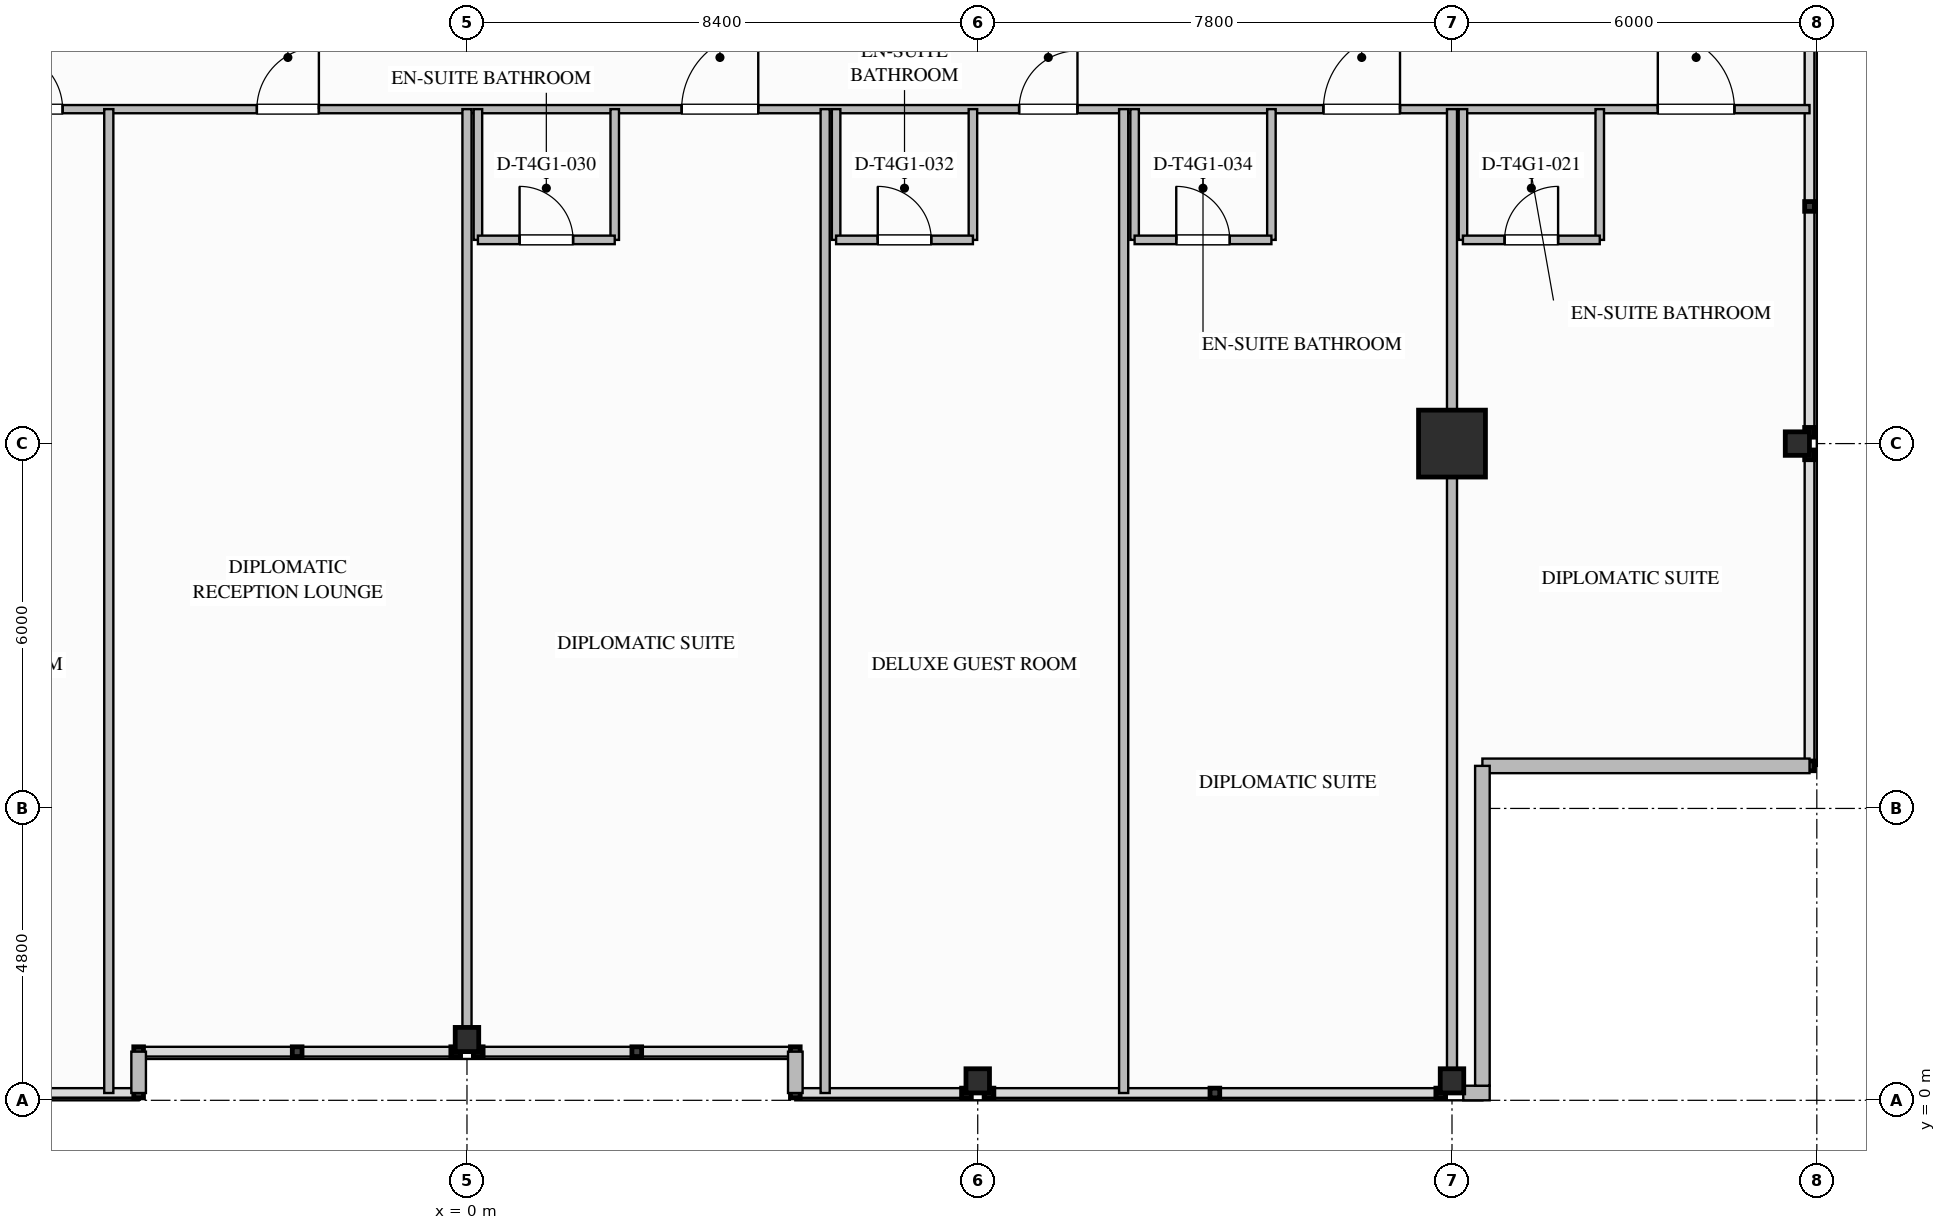
"""IFC4 building model, lengths in metres.
Left out: names, types, materials, properties, quantities, classifications, styles, units other than length and angle.
Written with IfcOpenShell. Run it as: python <this file> out.ifc"""

import sys

from ifc_helpers import new_model, si_unit, direction, frame, frame_2d, origin, origin_2d, place, context, subcontext, project, spatial, rectangle, i_section, extrude, element, fill, save


model = new_model("IFC4")
c1 = context("Model", 3, precision=1e-05, world=origin(), true_north=direction((0.0, 1.0)))
c2 = subcontext(c1, "Body", "Model", "MODEL_VIEW")
j1 = project(units=[si_unit("LENGTHUNIT", "METRE"), si_unit("PLANEANGLEUNIT", "RADIAN")], contexts=[c1])
p1 = place(None, origin())
s1 = spatial("IfcSite", under=j1, at=p1, CompositionType="ELEMENT")
p2 = place(p1, origin())
s2 = spatial("IfcBuilding", under=s1, at=p2, CompositionType="ELEMENT")
p3 = place(p2, frame((0.0, 0.0, 208.7)))
s3 = spatial("IfcBuildingStorey", under=s2, at=p3, CompositionType="ELEMENT", Elevation=208.7)
p4 = place(p3, frame((16.2, 10.8, 0.0), z_axis=(0.0, 0.0, 1.0), x_axis=(1.0, 0.0, 0.0)))
e1 = element("IfcColumn", 1, at=p4, inside=s3, PredefinedType="COLUMN", context=c2, shape_type="SweptSolid", body=[
    extrude(rectangle(XDim=1.1, YDim=1.1, at=origin_2d()), origin(), (0.0, 0.0, 1.0), 3.6),
])
for number, where, z_axis, x_axis in (
    (2, (21.88, 10.8, 0.0), (0.0, 0.0, 1.0), (1.0, 0.0, 0.0)),
    (3, (0.0, 1.0, 0.0), (0.0, 0.0, 1.0), (0.0, 1.0, 0.0)),
    (4, (8.4, 0.32, 0.0), (0.0, 0.0, 1.0), (0.0, 1.0, 0.0)),
    (5, (16.2, 0.32, 0.0), (0.0, 0.0, 1.0), (0.0, 1.0, 0.0)),
):
    element("IfcColumn", number, at=place(p3, frame(where, z_axis=z_axis, x_axis=x_axis)), inside=s3, PredefinedType="COLUMN", context=c2, shape_type="SweptSolid", body=[
        extrude(i_section(OverallWidth=0.397, OverallDepth=0.387, WebThickness=0.021, FlangeThickness=0.033, FilletRadius=0.025, at=origin_2d()), origin(), (0.0, 0.0, 1.0), 3.597),
    ])
p5 = place(p3, frame((16.82, 0.12, 0.0), z_axis=(0.0, 0.0, 1.0), x_axis=(-1.0, 0.0, 0.0)))
e6 = element("IfcWall", 6, at=p5, inside=s3, PredefinedType="STANDARD", context=c2, shape_type="SweptSolid", body=[
    extrude(rectangle(XDim=0.435, YDim=0.24, at=frame_2d((0.217, 0.0))), origin(), (0.0, 0.0, 1.0), 3.34),
])
p6 = place(p3, frame((22.08, 5.5, 0.0), z_axis=(0.0, 0.0, 1.0), x_axis=(-1.0, 0.0, 0.0)))
e7 = element("IfcWall", 7, at=p6, inside=s3, PredefinedType="STANDARD", context=c2, shape_type="SweptSolid", body=[
    extrude(rectangle(XDim=5.38, YDim=0.24, at=frame_2d((2.69, 0.0))), origin(), (0.0, 0.0, 1.0), 3.34),
])
p7 = place(p3, frame((16.7, 5.5, 0.0), z_axis=(0.0, 0.0, 1.0), x_axis=(0.0, -1.0, 0.0)))
e8 = element("IfcWall", 8, at=p7, inside=s3, PredefinedType="STANDARD", context=c2, shape_type="SweptSolid", body=[
    extrude(rectangle(XDim=5.26, YDim=0.24, at=frame_2d((2.63, 0.0))), origin(), (0.0, 0.0, 1.0), 3.34),
])
for number, where, z_axis, x_axis in (
    (9, (5.4, 0.12, 0.0), (0.0, 0.0, 1.0), (0.0, 1.0, 0.0)),
    (10, (-5.4, 0.8, 0.0), (0.0, 0.0, 1.0), (0.0, -1.0, 0.0)),
):
    element("IfcWall", number, at=place(p3, frame(where, z_axis=z_axis, x_axis=x_axis)), inside=s3, PredefinedType="STANDARD", context=c2, shape_type="SweptSolid", body=[
        extrude(rectangle(XDim=0.68, YDim=0.24, at=frame_2d((0.34, 0.0))), origin(), (0.0, 0.0, 1.0), 3.34),
    ])
p8 = place(p3, frame((-16.2, 16.3, 0.0), z_axis=(0.0, 0.0, 1.0), x_axis=(1.0, 0.0, 0.0)))
e11 = element("IfcWall", 11, at=p8, inside=s3, PredefinedType="PARTITIONING", context=c2, shape_type="SweptSolid", body=[
    extrude(rectangle(XDim=38.28, YDim=0.135, at=frame_2d((19.14, 0.0))), origin(), (0.0, 0.0, 1.0), 3.34),
])
p9 = place(p8, frame((35.785, 0.0, 0.0)))
e12 = element("IfcOpeningElement", 12, at=p9, cuts=e11, PredefinedType="OPENING", context=c2, shape_type="SweptSolid", body=[
    extrude(rectangle(XDim=1.26, YDim=2.2, at=frame_2d((0.63, 1.1))), frame((0.0, 0.077, 0.0), z_axis=(0.0, -1.0, 0.0), x_axis=(1.0, 0.0, 0.0)), (0.0, 0.0, 1.0), 0.155),
])
p10 = place(p8, frame((3.285, 0.0, 0.0)))
e13 = element("IfcOpeningElement", 13, at=p10, cuts=e11, PredefinedType="OPENING", context=c2, shape_type="SweptSolid", body=[
    extrude(rectangle(XDim=1.26, YDim=2.2, at=frame_2d((0.63, 1.1))), frame((0.0, 0.077, 0.0), z_axis=(0.0, -1.0, 0.0), x_axis=(1.0, 0.0, 0.0)), (0.0, 0.0, 1.0), 0.155),
])
p11 = place(p8, frame((8.59, 0.0, 0.0)))
e14 = element("IfcOpeningElement", 14, at=p11, cuts=e11, PredefinedType="OPENING", context=c2, shape_type="SweptSolid", body=[
    extrude(rectangle(XDim=0.96, YDim=2.15, at=frame_2d((0.48, 1.075))), frame((0.0, 0.077, 0.0), z_axis=(0.0, -1.0, 0.0), x_axis=(1.0, 0.0, 0.0)), (0.0, 0.0, 1.0), 0.155),
])
p12 = place(p8, frame((12.744, 0.0, 0.0)))
e15 = element("IfcOpeningElement", 15, at=p12, cuts=e11, PredefinedType="OPENING", context=c2, shape_type="SweptSolid", body=[
    extrude(rectangle(XDim=1.02, YDim=2.15, at=frame_2d((0.51, 1.075))), frame((0.0, 0.077, 0.0), z_axis=(0.0, -1.0, 0.0), x_axis=(1.0, 0.0, 0.0)), (0.0, 0.0, 1.0), 0.155),
])
p13 = place(p8, frame((19.73, 0.0, 0.0)))
e16 = element("IfcOpeningElement", 16, at=p13, cuts=e11, PredefinedType="OPENING", context=c2, shape_type="SweptSolid", body=[
    extrude(rectangle(XDim=1.26, YDim=2.2, at=frame_2d((0.63, 1.1))), frame((0.0, 0.077, 0.0), z_axis=(0.0, -1.0, 0.0), x_axis=(1.0, 0.0, 0.0)), (0.0, 0.0, 1.0), 0.155),
])
p14 = place(p8, frame((25.281, 0.0, 0.0)))
e17 = element("IfcOpeningElement", 17, at=p14, cuts=e11, PredefinedType="OPENING", context=c2, shape_type="SweptSolid", body=[
    extrude(rectangle(XDim=0.96, YDim=2.15, at=frame_2d((0.48, 1.075))), frame((0.0, 0.077, 0.0), z_axis=(0.0, -1.0, 0.0), x_axis=(1.0, 0.0, 0.0)), (0.0, 0.0, 1.0), 0.155),
])
p15 = place(p8, frame((30.285, 0.0, 0.0)))
e18 = element("IfcOpeningElement", 18, at=p15, cuts=e11, PredefinedType="OPENING", context=c2, shape_type="SweptSolid", body=[
    extrude(rectangle(XDim=1.26, YDim=2.2, at=frame_2d((0.63, 1.1))), frame((0.0, 0.077, 0.0), z_axis=(0.0, -1.0, 0.0), x_axis=(1.0, 0.0, 0.0)), (0.0, 0.0, 1.0), 0.155),
])
p16 = place(p3, frame((16.2, 0.12, 0.0), z_axis=(0.0, 0.0, 1.0), x_axis=(0.0, 1.0, 0.0)))
e19 = element("IfcWall", 19, at=p16, inside=s3, PredefinedType="PARTITIONING", context=c2, shape_type="SweptSolid", body=[
    extrude(rectangle(XDim=16.18, YDim=0.165, at=frame_2d((8.09, 0.0))), origin(), (0.0, 0.0, 1.0), 2.714),
])
p17 = place(p3, frame((16.38, 16.3, 0.0), z_axis=(0.0, 0.0, 1.0), x_axis=(0.0, -1.0, 0.0)))
e20 = element("IfcWall", 20, at=p17, inside=s3, PredefinedType="PLUMBINGWALL", context=c2, shape_type="SweptSolid", body=[
    extrude(rectangle(XDim=2.15, YDim=0.14, at=frame_2d((1.075, 0.0))), origin(), (0.0, 0.0, 1.0), 2.714),
])
p18 = place(p3, frame((18.63, 16.3, 0.0), z_axis=(0.0, 0.0, 1.0), x_axis=(0.0, -1.0, 0.0)))
e21 = element("IfcWall", 21, at=p18, inside=s3, PredefinedType="PLUMBINGWALL", context=c2, shape_type="SweptSolid", body=[
    extrude(rectangle(XDim=2.15, YDim=0.14, at=frame_2d((1.075, 0.0))), origin(), (0.0, 0.0, 1.0), 3.34),
])
p19 = place(p3, frame((16.38, 14.15, 0.0), z_axis=(0.0, 0.0, 1.0), x_axis=(1.0, 0.0, 0.0)))
e22 = element("IfcWall", 22, at=p19, inside=s3, PredefinedType="PLUMBINGWALL", context=c2, shape_type="SweptSolid", body=[
    extrude(rectangle(XDim=2.25, YDim=0.14, at=frame_2d((1.125, 0.0))), origin(), (0.0, 0.0, 1.0), 3.34),
])
p20 = place(p19, frame((0.685, 0.0, 0.0)))
e23 = element("IfcOpeningElement", 23, at=p20, cuts=e22, PredefinedType="OPENING", context=c2, shape_type="SweptSolid", body=[
    extrude(rectangle(XDim=0.88, YDim=2.1, at=frame_2d((0.44, 1.05))), frame((0.0, 0.08, 0.0), z_axis=(0.0, -1.0, 0.0), x_axis=(1.0, 0.0, 0.0)), (0.0, 0.0, 1.0), 0.16),
])
p21 = place(p3, frame((-5.891, 0.12, 0.0), z_axis=(0.0, 0.0, 1.0), x_axis=(0.0, 1.0, 0.0)))
e24 = element("IfcWall", 24, at=p21, inside=s3, PredefinedType="PARTITIONING", context=c2, shape_type="SweptSolid", body=[
    extrude(rectangle(XDim=16.18, YDim=0.15, at=frame_2d((8.09, 0.0))), origin(), (0.0, 0.0, 1.0), 3.34),
])
p22 = place(p3, frame((0.0, 0.8, 0.0), z_axis=(0.0, 0.0, 1.0), x_axis=(0.0, 1.0, 0.0)))
e25 = element("IfcWall", 25, at=p22, inside=s3, PredefinedType="PARTITIONING", context=c2, shape_type="SweptSolid", body=[
    extrude(rectangle(XDim=15.5, YDim=0.15, at=frame_2d((7.75, 0.0))), origin(), (0.0, 0.0, 1.0), 2.714),
])
p23 = place(p3, frame((0.18, 16.3, 0.0), z_axis=(0.0, 0.0, 1.0), x_axis=(0.0, -1.0, 0.0)))
e26 = element("IfcWall", 26, at=p23, inside=s3, PredefinedType="PLUMBINGWALL", context=c2, shape_type="SweptSolid", body=[
    extrude(rectangle(XDim=2.15, YDim=0.14, at=frame_2d((1.075, 0.0))), origin(), (0.0, 0.0, 1.0), 2.718),
])
p24 = place(p3, frame((2.43, 16.3, 0.0), z_axis=(0.0, 0.0, 1.0), x_axis=(0.0, -1.0, 0.0)))
e27 = element("IfcWall", 27, at=p24, inside=s3, PredefinedType="PLUMBINGWALL", context=c2, shape_type="SweptSolid", body=[
    extrude(rectangle(XDim=2.15, YDim=0.14, at=frame_2d((1.075, 0.0))), origin(), (0.0, 0.0, 1.0), 3.34),
])
p25 = place(p3, frame((0.18, 14.15, 0.0), z_axis=(0.0, 0.0, 1.0), x_axis=(1.0, 0.0, 0.0)))
e28 = element("IfcWall", 28, at=p25, inside=s3, PredefinedType="PLUMBINGWALL", context=c2, shape_type="SweptSolid", body=[
    extrude(rectangle(XDim=2.25, YDim=0.14, at=frame_2d((1.125, 0.0))), origin(), (0.0, 0.0, 1.0), 3.34),
])
p26 = place(p25, frame((0.685, 0.0, 0.0)))
e29 = element("IfcOpeningElement", 29, at=p26, cuts=e28, PredefinedType="OPENING", context=c2, shape_type="SweptSolid", body=[
    extrude(rectangle(XDim=0.88, YDim=2.1, at=frame_2d((0.44, 1.05))), frame((0.0, 0.08, 0.0), z_axis=(0.0, -1.0, 0.0), x_axis=(1.0, 0.0, 0.0)), (0.0, 0.0, 1.0), 0.16),
])
p27 = place(p3, frame((5.891, 0.12, 0.0), z_axis=(0.0, 0.0, 1.0), x_axis=(0.0, 1.0, 0.0)))
e30 = element("IfcWall", 30, at=p27, inside=s3, PredefinedType="PARTITIONING", context=c2, shape_type="SweptSolid", body=[
    extrude(rectangle(XDim=16.18, YDim=0.15, at=frame_2d((8.09, 0.0))), origin(), (0.0, 0.0, 1.0), 3.34),
])
p28 = place(p3, frame((6.071, 16.3, 0.0), z_axis=(0.0, 0.0, 1.0), x_axis=(0.0, -1.0, 0.0)))
e31 = element("IfcWall", 31, at=p28, inside=s3, PredefinedType="PLUMBINGWALL", context=c2, shape_type="SweptSolid", body=[
    extrude(rectangle(XDim=2.15, YDim=0.14, at=frame_2d((1.075, 0.0))), origin(), (0.0, 0.0, 1.0), 3.34),
])
p29 = place(p3, frame((8.321, 16.3, 0.0), z_axis=(0.0, 0.0, 1.0), x_axis=(0.0, -1.0, 0.0)))
e32 = element("IfcWall", 32, at=p29, inside=s3, PredefinedType="PLUMBINGWALL", context=c2, shape_type="SweptSolid", body=[
    extrude(rectangle(XDim=2.15, YDim=0.14, at=frame_2d((1.075, 0.0))), origin(), (0.0, 0.0, 1.0), 2.718),
])
p30 = place(p3, frame((6.071, 14.15, 0.0), z_axis=(0.0, 0.0, 1.0), x_axis=(1.0, 0.0, 0.0)))
e33 = element("IfcWall", 33, at=p30, inside=s3, PredefinedType="PLUMBINGWALL", context=c2, shape_type="SweptSolid", body=[
    extrude(rectangle(XDim=2.25, YDim=0.14, at=frame_2d((1.125, 0.0))), origin(), (0.0, 0.0, 1.0), 3.34),
])
p31 = place(p30, frame((0.685, 0.0, 0.0)))
e34 = element("IfcOpeningElement", 34, at=p31, cuts=e33, PredefinedType="OPENING", context=c2, shape_type="SweptSolid", body=[
    extrude(rectangle(XDim=0.88, YDim=2.1, at=frame_2d((0.44, 1.05))), frame((0.0, 0.08, 0.0), z_axis=(0.0, -1.0, 0.0), x_axis=(1.0, 0.0, 0.0)), (0.0, 0.0, 1.0), 0.16),
])
p32 = place(p3, frame((10.8, 0.12, 0.0), z_axis=(0.0, 0.0, 1.0), x_axis=(0.0, 1.0, 0.0)))
e35 = element("IfcWall", 35, at=p32, inside=s3, PredefinedType="PARTITIONING", context=c2, shape_type="SweptSolid", body=[
    extrude(rectangle(XDim=16.18, YDim=0.15, at=frame_2d((8.09, 0.0))), origin(), (0.0, 0.0, 1.0), 3.34),
])
for number, where, z_axis, x_axis in (
    (36, (10.98, 16.3, 0.0), (0.0, 0.0, 1.0), (0.0, -1.0, 0.0)),
    (37, (13.23, 16.3, 0.0), (0.0, 0.0, 1.0), (0.0, -1.0, 0.0)),
):
    element("IfcWall", number, at=place(p3, frame(where, z_axis=z_axis, x_axis=x_axis)), inside=s3, PredefinedType="PLUMBINGWALL", context=c2, shape_type="SweptSolid", body=[
        extrude(rectangle(XDim=2.15, YDim=0.14, at=frame_2d((1.075, 0.0))), origin(), (0.0, 0.0, 1.0), 3.34),
    ])
p33 = place(p3, frame((10.98, 14.15, 0.0), z_axis=(0.0, 0.0, 1.0), x_axis=(1.0, 0.0, 0.0)))
e38 = element("IfcWall", 38, at=p33, inside=s3, PredefinedType="PLUMBINGWALL", context=c2, shape_type="SweptSolid", body=[
    extrude(rectangle(XDim=2.25, YDim=0.14, at=frame_2d((1.125, 0.0))), origin(), (0.0, 0.0, 1.0), 3.34),
])
p34 = place(p33, frame((0.685, 0.0, 0.0)))
e39 = element("IfcOpeningElement", 39, at=p34, cuts=e38, PredefinedType="OPENING", context=c2, shape_type="SweptSolid", body=[
    extrude(rectangle(XDim=0.88, YDim=2.1, at=frame_2d((0.44, 1.05))), frame((0.0, 0.08, 0.0), z_axis=(0.0, -1.0, 0.0), x_axis=(1.0, 0.0, 0.0)), (0.0, 0.0, 1.0), 0.16),
])
p35 = place(p20, origin())
e40 = element("IfcDoor", 40, at=p35, inside=s3, OperationType="SINGLE_SWING_RIGHT", PredefinedType="DOOR", context=c2, shape_type="SweptSolid", body=[
    extrude(rectangle(XDim=0.88, YDim=2.1, at=frame_2d((0.44, 1.05))), frame((0.0, 0.025, 0.0), z_axis=(0.0, -1.0, 0.0), x_axis=(1.0, 0.0, 0.0)), (0.0, 0.0, 1.0), 0.05),
])
fill(e23, e40)
p36 = place(p9, origin())
e41 = element("IfcDoor", 41, at=p36, inside=s3, OperationType="SINGLE_SWING_LEFT", PredefinedType="DOOR", context=c2, shape_type="SweptSolid", body=[
    extrude(rectangle(XDim=1.26, YDim=2.2, at=frame_2d((0.63, 1.1))), frame((0.0, 0.025, 0.0), z_axis=(0.0, -1.0, 0.0), x_axis=(1.0, 0.0, 0.0)), (0.0, 0.0, 1.0), 0.05),
])
fill(e12, e41)
p37 = place(p11, origin())
e42 = element("IfcDoor", 42, at=p37, inside=s3, OperationType="SINGLE_SWING_LEFT", PredefinedType="DOOR", context=c2, shape_type="SweptSolid", body=[
    extrude(rectangle(XDim=0.96, YDim=2.15, at=frame_2d((0.48, 1.075))), frame((0.0, 0.025, 0.0), z_axis=(0.0, -1.0, 0.0), x_axis=(1.0, 0.0, 0.0)), (0.0, 0.0, 1.0), 0.05),
])
fill(e14, e42)
p38 = place(p12, origin())
e43 = element("IfcDoor", 43, at=p38, inside=s3, OperationType="SINGLE_SWING_RIGHT", PredefinedType="DOOR", context=c2, shape_type="SweptSolid", body=[
    extrude(rectangle(XDim=1.02, YDim=2.15, at=frame_2d((0.51, 1.075))), frame((0.0, 0.025, 0.0), z_axis=(0.0, -1.0, 0.0), x_axis=(1.0, 0.0, 0.0)), (0.0, 0.0, 1.0), 0.05),
])
fill(e15, e43)
p39 = place(p26, origin())
e44 = element("IfcDoor", 44, at=p39, inside=s3, OperationType="SINGLE_SWING_LEFT", PredefinedType="DOOR", context=c2, shape_type="SweptSolid", body=[
    extrude(rectangle(XDim=0.88, YDim=2.1, at=frame_2d((0.44, 1.05))), frame((0.0, 0.025, 0.0), z_axis=(0.0, -1.0, 0.0), x_axis=(1.0, 0.0, 0.0)), (0.0, 0.0, 1.0), 0.05),
])
fill(e29, e44)
p40 = place(p13, origin())
e45 = element("IfcDoor", 45, at=p40, inside=s3, OperationType="SINGLE_SWING_RIGHT", PredefinedType="DOOR", context=c2, shape_type="SweptSolid", body=[
    extrude(rectangle(XDim=1.26, YDim=2.2, at=frame_2d((0.63, 1.1))), frame((0.0, 0.025, 0.0), z_axis=(0.0, -1.0, 0.0), x_axis=(1.0, 0.0, 0.0)), (0.0, 0.0, 1.0), 0.05),
])
fill(e16, e45)
p41 = place(p31, origin())
e46 = element("IfcDoor", 46, at=p41, inside=s3, OperationType="SINGLE_SWING_LEFT", PredefinedType="DOOR", context=c2, shape_type="SweptSolid", body=[
    extrude(rectangle(XDim=0.88, YDim=2.1, at=frame_2d((0.44, 1.05))), frame((0.0, 0.025, 0.0), z_axis=(0.0, -1.0, 0.0), x_axis=(1.0, 0.0, 0.0)), (0.0, 0.0, 1.0), 0.05),
])
fill(e34, e46)
p42 = place(p14, origin())
e47 = element("IfcDoor", 47, at=p42, inside=s3, OperationType="SINGLE_SWING_RIGHT", PredefinedType="DOOR", context=c2, shape_type="SweptSolid", body=[
    extrude(rectangle(XDim=0.96, YDim=2.15, at=frame_2d((0.48, 1.075))), frame((0.0, 0.025, 0.0), z_axis=(0.0, -1.0, 0.0), x_axis=(1.0, 0.0, 0.0)), (0.0, 0.0, 1.0), 0.05),
])
fill(e17, e47)
p43 = place(p34, origin())
e48 = element("IfcDoor", 48, at=p43, inside=s3, OperationType="SINGLE_SWING_LEFT", PredefinedType="DOOR", context=c2, shape_type="SweptSolid", body=[
    extrude(rectangle(XDim=0.88, YDim=2.1, at=frame_2d((0.44, 1.05))), frame((0.0, 0.025, 0.0), z_axis=(0.0, -1.0, 0.0), x_axis=(1.0, 0.0, 0.0)), (0.0, 0.0, 1.0), 0.05),
])
fill(e39, e48)
p44 = place(p15, origin())
e49 = element("IfcDoor", 49, at=p44, inside=s3, OperationType="SINGLE_SWING_RIGHT", PredefinedType="DOOR", context=c2, shape_type="SweptSolid", body=[
    extrude(rectangle(XDim=1.26, YDim=2.2, at=frame_2d((0.63, 1.1))), frame((0.0, 0.025, 0.0), z_axis=(0.0, -1.0, 0.0), x_axis=(1.0, 0.0, 0.0)), (0.0, 0.0, 1.0), 0.05),
])
fill(e18, e49)
save(model, sys.argv[1])
